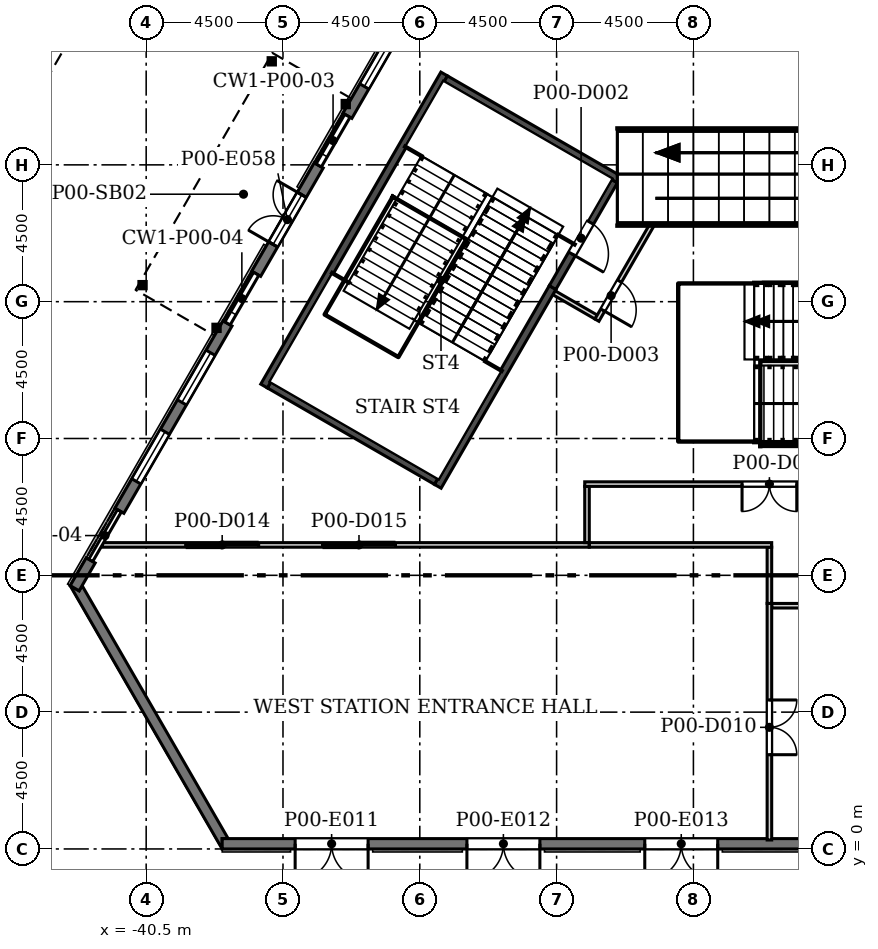
"""IFC4 building model, lengths in metres.
Left out: names, types, materials, properties, quantities, classifications, styles, units other than length and angle.
Written with IfcOpenShell. Run it as: python <this file> out.ifc"""

import sys

from ifc_helpers import new_model, si_unit, direction, frame, frame_2d, origin, origin_2d, place, context, subcontext, project, spatial, polyline, rectangle, hollow_circle, outline, extrude, element, fill, save


model = new_model("IFC4")
c1 = context("Model", 3, precision=1e-05, world=origin(), true_north=direction((0.0, 1.0)))
c2 = subcontext(c1, "Body", "Model", "MODEL_VIEW")
j1 = project(units=[si_unit("LENGTHUNIT", "METRE"), si_unit("PLANEANGLEUNIT", "RADIAN")], contexts=[c1])
p1 = place(None, origin())
s1 = spatial("IfcSite", under=j1, at=p1, CompositionType="ELEMENT")
p2 = place(p1, origin())
s2 = spatial("IfcBuilding", under=s1, at=p2, CompositionType="ELEMENT")
p3 = place(p2, origin())
s3 = spatial("IfcBuildingStorey", under=s2, at=p3, CompositionType="ELEMENT", Elevation=0.0)
p4 = place(p3, origin())
e1 = element("IfcWall", 1, at=p4, inside=s3, PredefinedType="SOLIDWALL", context=c2, shape_type="SweptSolid", body=[
    extrude(outline(polyline([(-43.001, 8.661), (-42.706, 8.491), (-42.607, 8.661), (-37.803, 0.339), (-38.0, 0.339), (-38.0, -0.001), (-38.0, -0.001), (-43.001, 8.661), (-43.001, 8.661)])), origin(), (0.0, 0.0, 1.0), 7.7),
])
p5 = place(p3, frame((-38.0, 0.17, 0.0), z_axis=(0.0, 0.0, 1.0), x_axis=(1.0, 0.0, 0.0)))
e2 = element("IfcWall", 2, at=p5, inside=s3, PredefinedType="SOLIDWALL", context=c2, shape_type="SweptSolid", body=[
    extrude(rectangle(XDim=76.0, YDim=0.34, at=frame_2d((38.0, 0.0))), origin(), (0.0, 0.0, 1.0), 7.7),
])
p6 = place(p5, frame((2.4, 0.0, 0.0)))
e3 = element("IfcOpeningElement", 3, at=p6, cuts=e2, PredefinedType="OPENING", context=c2, shape_type="SweptSolid", body=[
    extrude(rectangle(XDim=2.4, YDim=2.7, at=frame_2d((1.2, 1.35))), frame((0.0, 0.18, 0.0), z_axis=(0.0, -1.0, 0.0), x_axis=(1.0, 0.0, 0.0)), (0.0, 0.0, 1.0), 0.36),
])
p7 = place(p5, frame((8.05, 0.0, 0.0)))
e4 = element("IfcOpeningElement", 4, at=p7, cuts=e2, PredefinedType="OPENING", context=c2, shape_type="SweptSolid", body=[
    extrude(rectangle(XDim=2.4, YDim=2.7, at=frame_2d((1.2, 1.35))), frame((0.0, 0.18, 0.0), z_axis=(0.0, -1.0, 0.0), x_axis=(1.0, 0.0, 0.0)), (0.0, 0.0, 1.0), 0.36),
])
p8 = place(p5, frame((13.9, 0.0, 0.0)))
e5 = element("IfcOpeningElement", 5, at=p8, cuts=e2, PredefinedType="OPENING", context=c2, shape_type="SweptSolid", body=[
    extrude(rectangle(XDim=2.4, YDim=2.7, at=frame_2d((1.2, 1.35))), frame((0.0, 0.18, 0.0), z_axis=(0.0, -1.0, 0.0), x_axis=(1.0, 0.0, 0.0)), (0.0, 0.0, 1.0), 0.36),
])
p9 = place(p5, frame((59.7, 0.0, 0.0)))
e6 = element("IfcOpeningElement", 6, at=p9, cuts=e2, PredefinedType="OPENING", context=c2, shape_type="SweptSolid", body=[
    extrude(rectangle(XDim=2.4, YDim=2.7, at=frame_2d((1.2, 1.35))), frame((0.0, 0.18, 0.0), z_axis=(0.0, -1.0, 0.0), x_axis=(1.0, 0.0, 0.0)), (0.0, 0.0, 1.0), 0.36),
])
p10 = place(p5, frame((65.55, 0.0, 0.0)))
e7 = element("IfcOpeningElement", 7, at=p10, cuts=e2, PredefinedType="OPENING", context=c2, shape_type="SweptSolid", body=[
    extrude(rectangle(XDim=2.4, YDim=2.7, at=frame_2d((1.2, 1.35))), frame((0.0, 0.18, 0.0), z_axis=(0.0, -1.0, 0.0), x_axis=(1.0, 0.0, 0.0)), (0.0, 0.0, 1.0), 0.36),
])
p11 = place(p5, frame((71.2, 0.0, 0.0)))
e8 = element("IfcOpeningElement", 8, at=p11, cuts=e2, PredefinedType="OPENING", context=c2, shape_type="SweptSolid", body=[
    extrude(rectangle(XDim=2.4, YDim=2.7, at=frame_2d((1.2, 1.35))), frame((0.0, 0.18, 0.0), z_axis=(0.0, -1.0, 0.0), x_axis=(1.0, 0.0, 0.0)), (0.0, 0.0, 1.0), 0.36),
])
p12 = place(p5, frame((19.8, 0.0, 0.0)))
e9 = element("IfcOpeningElement", 9, at=p12, cuts=e2, PredefinedType="OPENING", context=c2, shape_type="SweptSolid", body=[
    extrude(rectangle(XDim=2.4, YDim=2.7, at=frame_2d((1.2, 1.35))), frame((0.0, 0.18, 0.0), z_axis=(0.0, -1.0, 0.0), x_axis=(1.0, 0.0, 0.0)), (0.0, 0.0, 1.0), 0.36),
])
p13 = place(p5, frame((53.8, 0.0, 0.0)))
e10 = element("IfcOpeningElement", 10, at=p13, cuts=e2, PredefinedType="OPENING", context=c2, shape_type="SweptSolid", body=[
    extrude(rectangle(XDim=2.4, YDim=2.7, at=frame_2d((1.2, 1.35))), frame((0.0, 0.18, 0.0), z_axis=(0.0, -1.0, 0.0), x_axis=(1.0, 0.0, 0.0)), (0.0, 0.0, 1.0), 0.36),
])
p14 = place(p3, frame((-31.824, 27.677, 0.0), z_axis=(0.0, 0.0, 1.0), x_axis=(-0.500044296292, -0.865999827798, 0.0)))
e11 = element("IfcWall", 11, at=p14, inside=s3, PredefinedType="SOLIDWALL", context=c2, shape_type="SweptSolid", body=[
    extrude(rectangle(XDim=4.115, YDim=0.34, at=frame_2d((2.058, 0.0))), origin(), (0.0, 0.0, 1.0), 7.7),
])
p15 = place(p14, frame((1.115, 0.0, 0.9)))
e12 = element("IfcOpeningElement", 12, at=p15, cuts=e11, PredefinedType="OPENING", context=c2, shape_type="SweptSolid", body=[
    extrude(rectangle(XDim=1.885, YDim=3.5, at=frame_2d((0.942, 1.75))), frame((0.0, 0.18, 0.0), z_axis=(0.0, -1.0, 0.0), x_axis=(1.0, 0.0, 0.0)), (0.0, 0.0, 1.0), 0.36),
])
p16 = place(p3, frame((-34.824, 22.481, 0.0), z_axis=(0.0, 0.0, 1.0), x_axis=(-0.500018604663, -0.866014662111, 0.0)))
e13 = element("IfcWall", 13, at=p16, inside=s3, PredefinedType="SOLIDWALL", context=c2, shape_type="SweptSolid", body=[
    extrude(rectangle(XDim=4.115, YDim=0.34, at=frame_2d((2.058, 0.0))), origin(), (0.0, 0.0, 1.0), 7.7),
])
p17 = place(p16, frame((1.115, 0.0, 0.0)))
e14 = element("IfcOpeningElement", 14, at=p17, cuts=e13, PredefinedType="OPENING", context=c2, shape_type="SweptSolid", body=[
    extrude(rectangle(XDim=1.885, YDim=2.4, at=frame_2d((0.942, 1.2))), frame((0.0, 0.18, 0.0), z_axis=(0.0, -1.0, 0.0), x_axis=(1.0, 0.0, 0.0)), (0.0, 0.0, 1.0), 0.36),
])
p18 = place(p16, frame((1.115, 0.0, 2.6)))
e15 = element("IfcOpeningElement", 15, at=p18, cuts=e13, PredefinedType="OPENING", context=c2, shape_type="SweptSolid", body=[
    extrude(rectangle(XDim=1.885, YDim=4.8, at=frame_2d((0.942, 2.4))), frame((0.0, 0.18, 0.0), z_axis=(0.0, -1.0, 0.0), x_axis=(1.0, 0.0, 0.0)), (0.0, 0.0, 1.0), 0.36),
])
p19 = place(p3, frame((-37.824, 17.285, 0.0), z_axis=(0.0, 0.0, 1.0), x_axis=(-0.500006602356, -0.866021591879, 0.0)))
e16 = element("IfcWall", 16, at=p19, inside=s3, PredefinedType="SOLIDWALL", context=c2, shape_type="SweptSolid", body=[
    extrude(rectangle(XDim=7.115, YDim=0.34, at=frame_2d((3.558, 0.0))), origin(), (0.0, 0.0, 1.0), 7.7),
])
p20 = place(p19, frame((1.115, 0.0, 0.9)))
e17 = element("IfcOpeningElement", 17, at=p20, cuts=e16, PredefinedType="OPENING", context=c2, shape_type="SweptSolid", body=[
    extrude(rectangle(XDim=1.885, YDim=3.5, at=frame_2d((0.942, 1.75))), frame((0.0, 0.18, 0.0), z_axis=(0.0, -1.0, 0.0), x_axis=(1.0, 0.0, 0.0)), (0.0, 0.0, 1.0), 0.36),
])
p21 = place(p19, frame((4.115, 0.0, 0.9)))
e18 = element("IfcOpeningElement", 18, at=p21, cuts=e16, PredefinedType="OPENING", context=c2, shape_type="SweptSolid", body=[
    extrude(rectangle(XDim=1.885, YDim=3.5, at=frame_2d((0.942, 1.75))), frame((0.0, 0.18, 0.0), z_axis=(0.0, -1.0, 0.0), x_axis=(1.0, 0.0, 0.0)), (0.0, 0.0, 1.0), 0.36),
])
p22 = place(p3, frame((-42.324, 9.491, 0.0), z_axis=(0.0, 0.0, 1.0), x_axis=(-0.500062184469, -0.865989498588, 0.0)))
e19 = element("IfcWall", 19, at=p22, inside=s3, PredefinedType="SOLIDWALL", context=c2, shape_type="SweptSolid", body=[
    extrude(rectangle(XDim=1.057, YDim=0.34, at=frame_2d((0.529, 0.0))), origin(), (0.0, 0.0, 1.0), 7.7),
])
for number, where, z_axis, x_axis in (
    (20, (-36.369, 25.905, 0.0), (0.0, 0.0, 1.0), (1.0, 0.0, 0.0)),
    (21, (-40.619, 18.544, 0.0), (0.0, 0.0, 1.0), (1.0, 0.0, 0.0)),
    (22, (-33.936, 24.5, 0.0), (0.0, 0.0, 1.0), (1.0, 0.0, 0.0)),
    (23, (-38.186, 17.139, 0.0), (0.0, 0.0, 1.0), (1.0, 0.0, 0.0)),
):
    element("IfcColumn", number, at=place(p3, frame(where, z_axis=z_axis, x_axis=x_axis)), inside=s3, PredefinedType="COLUMN", context=c2, shape_type="SweptSolid", body=[
        extrude(hollow_circle(Radius=0.07, WallThickness=0.008, at=origin_2d()), origin(), (0.0, 0.0, 1.0), 4.45),
    ])
p23 = place(p3, frame((-19.925, 8.0, 0.0), z_axis=(0.0, 0.0, 1.0), x_axis=(1.0, 0.0, 0.0)))
e24 = element("IfcWall", 24, at=p23, inside=s3, PredefinedType="PARTITIONING", context=c2, shape_type="SweptSolid", body=[
    extrude(rectangle(XDim=5.97, YDim=0.15, at=frame_2d((2.985, 0.0))), origin(), (0.0, 0.0, 1.0), 7.7),
])
p24 = place(p23, frame((2.325, 0.0, 0.0)))
e25 = element("IfcOpeningElement", 25, at=p24, cuts=e24, PredefinedType="OPENING", context=c2, shape_type="SweptSolid", body=[
    extrude(rectangle(XDim=1.2, YDim=2.1, at=frame_2d((0.6, 1.05))), frame((0.0, 0.085, 0.0), z_axis=(0.0, -1.0, 0.0), x_axis=(1.0, 0.0, 0.0)), (0.0, 0.0, 1.0), 0.17),
])
p25 = place(p3, frame((-20.0, 8.075, 0.0), z_axis=(0.0, 0.0, 1.0), x_axis=(0.0, -1.0, 0.0)))
e26 = element("IfcWall", 26, at=p25, inside=s3, PredefinedType="PARTITIONING", context=c2, shape_type="SweptSolid", body=[
    extrude(rectangle(XDim=7.78, YDim=0.15, at=frame_2d((3.89, 0.0))), origin(), (0.0, 0.0, 1.0), 7.7),
])
p26 = place(p25, frame((3.175, 0.0, 0.0)))
e27 = element("IfcOpeningElement", 27, at=p26, cuts=e26, PredefinedType="OPENING", context=c2, shape_type="SweptSolid", body=[
    extrude(rectangle(XDim=1.8, YDim=2.1, at=frame_2d((0.9, 1.05))), frame((0.0, 0.085, 0.0), z_axis=(0.0, -1.0, 0.0), x_axis=(1.0, 0.0, 0.0)), (0.0, 0.0, 1.0), 0.17),
])
p27 = place(p3, frame((-20.0, 9.925, 0.0), z_axis=(0.0, 0.0, 1.0), x_axis=(0.0, -1.0, 0.0)))
e28 = element("IfcWall", 28, at=p27, inside=s3, PredefinedType="PARTITIONING", context=c2, shape_type="SweptSolid", body=[
    extrude(rectangle(XDim=1.85, YDim=0.15, at=frame_2d((0.925, 0.0))), origin(), (0.0, 0.0, 1.0), 7.7),
])
p28 = place(p3, frame((-41.944, 10.0, 0.0), z_axis=(0.0, 0.0, 1.0), x_axis=(1.0, 0.0, 0.0)))
e29 = element("IfcWall", 29, at=p28, inside=s3, PredefinedType="PARTITIONING", context=c2, shape_type="SweptSolid", body=[
    extrude(rectangle(XDim=16.019, YDim=0.15, at=frame_2d((8.009, 0.0))), origin(), (0.0, 0.0, 1.0), 7.7),
])
p29 = place(p28, frame((2.744, 0.0, 0.0)))
e30 = element("IfcOpeningElement", 30, at=p29, cuts=e29, PredefinedType="OPENING", context=c2, shape_type="SweptSolid", body=[
    extrude(rectangle(XDim=2.4, YDim=2.4, at=frame_2d((1.2, 1.2))), frame((0.0, 0.085, 0.0), z_axis=(0.0, -1.0, 0.0), x_axis=(1.0, 0.0, 0.0)), (0.0, 0.0, 1.0), 0.17),
])
p30 = place(p28, frame((7.244, 0.0, 0.0)))
e31 = element("IfcOpeningElement", 31, at=p30, cuts=e29, PredefinedType="OPENING", context=c2, shape_type="SweptSolid", body=[
    extrude(rectangle(XDim=2.4, YDim=2.4, at=frame_2d((1.2, 1.2))), frame((0.0, 0.085, 0.0), z_axis=(0.0, -1.0, 0.0), x_axis=(1.0, 0.0, 0.0)), (0.0, 0.0, 1.0), 0.17),
])
p31 = place(p3, frame((-25.925, 10.0, 0.0), z_axis=(0.0, 0.0, 1.0), x_axis=(1.0, 0.0, 0.0)))
e32 = element("IfcWall", 32, at=p31, inside=s3, PredefinedType="PARTITIONING", context=c2, shape_type="SweptSolid", body=[
    extrude(rectangle(XDim=6.0, YDim=0.15, at=frame_2d((3.0, 0.0))), origin(), (0.0, 0.0, 1.0), 7.7),
])
p32 = place(p3, frame((-26.0, 10.075, 0.0), z_axis=(0.0, 0.0, 1.0), x_axis=(0.0, 1.0, 0.0)))
e33 = element("IfcWall", 33, at=p32, inside=s3, PredefinedType="PARTITIONING", context=c2, shape_type="SweptSolid", body=[
    extrude(rectangle(XDim=1.85, YDim=0.15, at=frame_2d((0.925, 0.0))), origin(), (0.0, 0.0, 1.0), 7.7),
])
p33 = place(p3, frame((-26.075, 12.0, 0.0), z_axis=(0.0, 0.0, 1.0), x_axis=(1.0, 0.0, 0.0)))
e34 = element("IfcWall", 34, at=p33, inside=s3, PredefinedType="PARTITIONING", context=c2, shape_type="SweptSolid", body=[
    extrude(rectangle(XDim=12.15, YDim=0.15, at=frame_2d((6.075, 0.0))), origin(), (0.0, 0.0, 1.0), 7.7),
])
p34 = place(p33, frame((5.175, 0.0, 0.0)))
e35 = element("IfcOpeningElement", 35, at=p34, cuts=e34, PredefinedType="OPENING", context=c2, shape_type="SweptSolid", body=[
    extrude(rectangle(XDim=1.8, YDim=2.1, at=frame_2d((0.9, 1.05))), frame((0.0, 0.085, 0.0), z_axis=(0.0, -1.0, 0.0), x_axis=(1.0, 0.0, 0.0)), (0.0, 0.0, 1.0), 0.17),
])
p35 = place(p3, frame((-30.953, 12.097, 0.0), z_axis=(0.0, 0.0, 1.0), x_axis=(-0.866038968831, 0.499976503915, 0.0)))
e36 = element("IfcWall", 36, at=p35, inside=s3, PredefinedType="SOLIDWALL", context=c2, shape_type="SweptSolid", body=[
    extrude(rectangle(XDim=6.35, YDim=0.25, at=frame_2d((3.175, 0.0))), origin(), (0.0, 0.0, 1.0), 7.7),
])
p36 = place(p3, frame((-36.623, 15.226, 0.0), z_axis=(0.0, 0.0, 1.0), x_axis=(0.499976885332, 0.866038748633, 0.0)))
e37 = element("IfcWall", 37, at=p36, inside=s3, PredefinedType="SOLIDWALL", context=c2, shape_type="SweptSolid", body=[
    extrude(rectangle(XDim=11.85, YDim=0.25, at=frame_2d((5.925, 0.0))), origin(), (0.0, 0.0, 1.0), 7.7),
])
p37 = place(p3, frame((-25.701, 17.494, 0.0), z_axis=(0.0, 0.0, 1.0), x_axis=(-0.866066190972, 0.499929347863, 0.0)))
e38 = element("IfcWall", 38, at=p37, inside=s3, PredefinedType="PARTITIONING", context=c2, shape_type="SweptSolid", body=[
    extrude(rectangle(XDim=1.6, YDim=0.15, at=frame_2d((0.8, 0.0))), origin(), (0.0, 0.0, 1.0), 7.7),
])
p38 = place(p3, frame((-27.132, 18.465, 0.0), z_axis=(0.0, 0.0, 1.0), x_axis=(-0.499985572004, -0.866033733632, 0.0)))
e39 = element("IfcWall", 39, at=p38, inside=s3, PredefinedType="SOLIDWALL", context=c2, shape_type="SweptSolid", body=[
    extrude(rectangle(XDim=7.55, YDim=0.25, at=frame_2d((3.775, 0.0))), origin(), (0.0, 0.0, 1.0), 7.7),
])
p39 = place(p3, frame((-23.841, 20.565, 0.0), z_axis=(0.0, 0.0, 1.0), x_axis=(-0.499958946799, -0.866049104564, 0.0)))
e40 = element("IfcWall", 40, at=p39, inside=s3, PredefinedType="PARTITIONING", context=c2, shape_type="SweptSolid", body=[
    extrude(rectangle(XDim=3.664, YDim=0.15, at=frame_2d((1.832, 0.0))), origin(), (0.0, 0.0, 1.0), 7.7),
])
p40 = place(p39, frame((2.182, 0.0, 0.0)))
e41 = element("IfcOpeningElement", 41, at=p40, cuts=e40, PredefinedType="OPENING", context=c2, shape_type="SweptSolid", body=[
    extrude(rectangle(XDim=1.1, YDim=2.1, at=frame_2d((0.55, 1.05))), frame((0.0, 0.085, 0.0), z_axis=(0.0, -1.0, 0.0), x_axis=(1.0, 0.0, 0.0)), (0.0, 0.0, 1.0), 0.17),
])
p41 = place(p3, frame((-25.107, 21.972, 0.0), z_axis=(0.0, 0.0, 1.0), x_axis=(-0.499971214291, -0.866042022584, 0.0)))
e42 = element("IfcWall", 42, at=p41, inside=s3, PredefinedType="SOLIDWALL", context=c2, shape_type="SweptSolid", body=[
    extrude(rectangle(XDim=4.05, YDim=0.25, at=frame_2d((2.025, 0.0))), origin(), (0.0, 0.0, 1.0), 7.7),
])
p42 = place(p41, frame((1.575, 0.0, 0.0)))
e43 = element("IfcOpeningElement", 43, at=p42, cuts=e42, PredefinedType="OPENING", context=c2, shape_type="SweptSolid", body=[
    extrude(rectangle(XDim=1.2, YDim=2.1, at=frame_2d((0.6, 1.05))), frame((0.0, 0.135, 0.0), z_axis=(0.0, -1.0, 0.0), x_axis=(1.0, 0.0, 0.0)), (0.0, 0.0, 1.0), 0.27),
])
p43 = place(p3, frame((-30.652, 25.318, 0.0), z_axis=(0.0, 0.0, 1.0), x_axis=(0.866049458236, -0.499958334153, 0.0)))
e44 = element("IfcWall", 44, at=p43, inside=s3, PredefinedType="SOLIDWALL", context=c2, shape_type="SweptSolid", body=[
    extrude(rectangle(XDim=6.6, YDim=0.25, at=frame_2d((3.3, 0.0))), origin(), (0.0, 0.0, 1.0), 7.7),
])
p44 = place(p3, frame((-22.875, 13.45, 0.0), z_axis=(0.0, 0.0, 1.0), x_axis=(0.0, 1.0, 0.0)))
e45 = element("IfcWall", 45, at=p44, inside=s3, PredefinedType="SOLIDWALL", context=c2, shape_type="SweptSolid", body=[
    extrude(rectangle(XDim=5.1, YDim=0.25, at=frame_2d((2.55, 0.0))), origin(), (0.0, 0.0, 1.0), 2.409),
])
for number, where, z_axis, x_axis in (
    (46, (-22.875, 13.525, 0.0), (0.0, 0.0, 1.0), (1.0, 0.0, 0.0)),
    (47, (-22.875, 18.475, 0.0), (0.0, 0.0, 1.0), (1.0, 0.0, 0.0)),
):
    element("IfcWall", number, at=place(p3, frame(where, z_axis=z_axis, x_axis=x_axis)), inside=s3, PredefinedType="SOLIDWALL", context=c2, shape_type="SweptSolid", body=[
        extrude(rectangle(XDim=2.25, YDim=0.25, at=frame_2d((1.125, 0.0))), origin(), (0.0, 0.0, 1.0), 2.409),
    ])
p45 = place(p6, frame((2.4, 0.0, 0.0), z_axis=(0.0, 0.0, 1.0), x_axis=(-1.0, 0.0, 0.0)))
e48 = element("IfcDoor", 48, at=p45, inside=s3, OperationType="DOUBLE_DOOR_SINGLE_SWING", PredefinedType="DOOR", context=c2, shape_type="SweptSolid", body=[
    extrude(rectangle(XDim=2.4, YDim=2.7, at=frame_2d((1.2, 1.35))), frame((0.0, 0.025, 0.0), z_axis=(0.0, -1.0, 0.0), x_axis=(1.0, 0.0, 0.0)), (0.0, 0.0, 1.0), 0.05),
])
fill(e3, e48)
p46 = place(p7, frame((2.4, 0.0, 0.0), z_axis=(0.0, 0.0, 1.0), x_axis=(-1.0, 0.0, 0.0)))
e49 = element("IfcDoor", 49, at=p46, inside=s3, OperationType="DOUBLE_DOOR_SINGLE_SWING", PredefinedType="DOOR", context=c2, shape_type="SweptSolid", body=[
    extrude(rectangle(XDim=2.4, YDim=2.7, at=frame_2d((1.2, 1.35))), frame((0.0, 0.025, 0.0), z_axis=(0.0, -1.0, 0.0), x_axis=(1.0, 0.0, 0.0)), (0.0, 0.0, 1.0), 0.05),
])
fill(e4, e49)
p47 = place(p8, frame((2.4, 0.0, 0.0), z_axis=(0.0, 0.0, 1.0), x_axis=(-1.0, 0.0, 0.0)))
e50 = element("IfcDoor", 50, at=p47, inside=s3, OperationType="DOUBLE_DOOR_SINGLE_SWING", PredefinedType="DOOR", context=c2, shape_type="SweptSolid", body=[
    extrude(rectangle(XDim=2.4, YDim=2.7, at=frame_2d((1.2, 1.35))), frame((0.0, 0.025, 0.0), z_axis=(0.0, -1.0, 0.0), x_axis=(1.0, 0.0, 0.0)), (0.0, 0.0, 1.0), 0.05),
])
fill(e5, e50)
p48 = place(p15, origin())
e51 = element("IfcWindow", 51, at=p48, inside=s3, PartitioningType="SINGLE_PANEL", PredefinedType="WINDOW", context=c2, shape_type="SweptSolid", body=[
    extrude(rectangle(XDim=1.885, YDim=3.5, at=frame_2d((0.942, 1.75))), frame((0.0, 0.11, 0.0), z_axis=(0.0, -1.0, 0.0), x_axis=(1.0, 0.0, 0.0)), (0.0, 0.0, 1.0), 0.06),
])
fill(e12, e51)
p49 = place(p17, frame((1.885, 0.0, 0.0), z_axis=(0.0, 0.0, 1.0), x_axis=(-1.0, 0.0, 0.0)))
e52 = element("IfcDoor", 52, at=p49, inside=s3, OperationType="DOUBLE_DOOR_SINGLE_SWING", PredefinedType="DOOR", context=c2, shape_type="SweptSolid", body=[
    extrude(rectangle(XDim=1.885, YDim=2.4, at=frame_2d((0.942, 1.2))), frame((0.0, 0.025, 0.0), z_axis=(0.0, -1.0, 0.0), x_axis=(1.0, 0.0, 0.0)), (0.0, 0.0, 1.0), 0.05),
])
fill(e14, e52)
p50 = place(p18, origin())
e53 = element("IfcWindow", 53, at=p50, inside=s3, PartitioningType="SINGLE_PANEL", PredefinedType="WINDOW", context=c2, shape_type="SweptSolid", body=[
    extrude(rectangle(XDim=1.885, YDim=4.8, at=frame_2d((0.942, 2.4))), frame((0.0, 0.11, 0.0), z_axis=(0.0, -1.0, 0.0), x_axis=(1.0, 0.0, 0.0)), (0.0, 0.0, 1.0), 0.06),
])
fill(e15, e53)
p51 = place(p20, origin())
e54 = element("IfcWindow", 54, at=p51, inside=s3, PartitioningType="SINGLE_PANEL", PredefinedType="WINDOW", context=c2, shape_type="SweptSolid", body=[
    extrude(rectangle(XDim=1.885, YDim=3.5, at=frame_2d((0.942, 1.75))), frame((0.0, 0.11, 0.0), z_axis=(0.0, -1.0, 0.0), x_axis=(1.0, 0.0, 0.0)), (0.0, 0.0, 1.0), 0.06),
])
fill(e17, e54)
p52 = place(p21, origin())
e55 = element("IfcWindow", 55, at=p52, inside=s3, PartitioningType="SINGLE_PANEL", PredefinedType="WINDOW", context=c2, shape_type="SweptSolid", body=[
    extrude(rectangle(XDim=1.885, YDim=3.5, at=frame_2d((0.942, 1.75))), frame((0.0, 0.11, 0.0), z_axis=(0.0, -1.0, 0.0), x_axis=(1.0, 0.0, 0.0)), (0.0, 0.0, 1.0), 0.06),
])
fill(e18, e55)
p53 = place(p42, origin())
e56 = element("IfcDoor", 56, at=p53, inside=s3, OperationType="SINGLE_SWING_RIGHT", PredefinedType="DOOR", context=c2, shape_type="SweptSolid", body=[
    extrude(rectangle(XDim=1.2, YDim=2.1, at=frame_2d((0.6, 1.05))), frame((0.0, 0.025, 0.0), z_axis=(0.0, -1.0, 0.0), x_axis=(1.0, 0.0, 0.0)), (0.0, 0.0, 1.0), 0.05),
])
fill(e43, e56)
p54 = place(p40, origin())
e57 = element("IfcDoor", 57, at=p54, inside=s3, OperationType="SINGLE_SWING_RIGHT", PredefinedType="DOOR", context=c2, shape_type="SweptSolid", body=[
    extrude(rectangle(XDim=1.1, YDim=2.1, at=frame_2d((0.55, 1.05))), frame((0.0, 0.025, 0.0), z_axis=(0.0, -1.0, 0.0), x_axis=(1.0, 0.0, 0.0)), (0.0, 0.0, 1.0), 0.05),
])
fill(e41, e57)
p55 = place(p26, origin())
e58 = element("IfcDoor", 58, at=p55, inside=s3, OperationType="DOUBLE_DOOR_SINGLE_SWING", PredefinedType="DOOR", context=c2, shape_type="SweptSolid", body=[
    extrude(rectangle(XDim=1.8, YDim=2.1, at=frame_2d((0.9, 1.05))), frame((0.0, 0.025, 0.0), z_axis=(0.0, -1.0, 0.0), x_axis=(1.0, 0.0, 0.0)), (0.0, 0.0, 1.0), 0.05),
])
fill(e27, e58)
p56 = place(p29, origin())
e59 = element("IfcDoor", 59, at=p56, inside=s3, OperationType="DOUBLE_DOOR_SLIDING", PredefinedType="DOOR", context=c2, shape_type="SweptSolid", body=[
    extrude(rectangle(XDim=2.4, YDim=2.4, at=frame_2d((1.2, 1.2))), frame((0.0, 0.025, 0.0), z_axis=(0.0, -1.0, 0.0), x_axis=(1.0, 0.0, 0.0)), (0.0, 0.0, 1.0), 0.05),
])
fill(e30, e59)
p57 = place(p30, origin())
e60 = element("IfcDoor", 60, at=p57, inside=s3, OperationType="DOUBLE_DOOR_SLIDING", PredefinedType="DOOR", context=c2, shape_type="SweptSolid", body=[
    extrude(rectangle(XDim=2.4, YDim=2.4, at=frame_2d((1.2, 1.2))), frame((0.0, 0.025, 0.0), z_axis=(0.0, -1.0, 0.0), x_axis=(1.0, 0.0, 0.0)), (0.0, 0.0, 1.0), 0.05),
])
fill(e31, e60)
p58 = place(p34, frame((1.8, 0.0, 0.0), z_axis=(0.0, 0.0, 1.0), x_axis=(-1.0, 0.0, 0.0)))
e61 = element("IfcDoor", 61, at=p58, inside=s3, OperationType="DOUBLE_DOOR_SINGLE_SWING", PredefinedType="DOOR", context=c2, shape_type="SweptSolid", body=[
    extrude(rectangle(XDim=1.8, YDim=2.1, at=frame_2d((0.9, 1.05))), frame((0.0, 0.025, 0.0), z_axis=(0.0, -1.0, 0.0), x_axis=(1.0, 0.0, 0.0)), (0.0, 0.0, 1.0), 0.05),
])
fill(e35, e61)
save(model, sys.argv[1])
